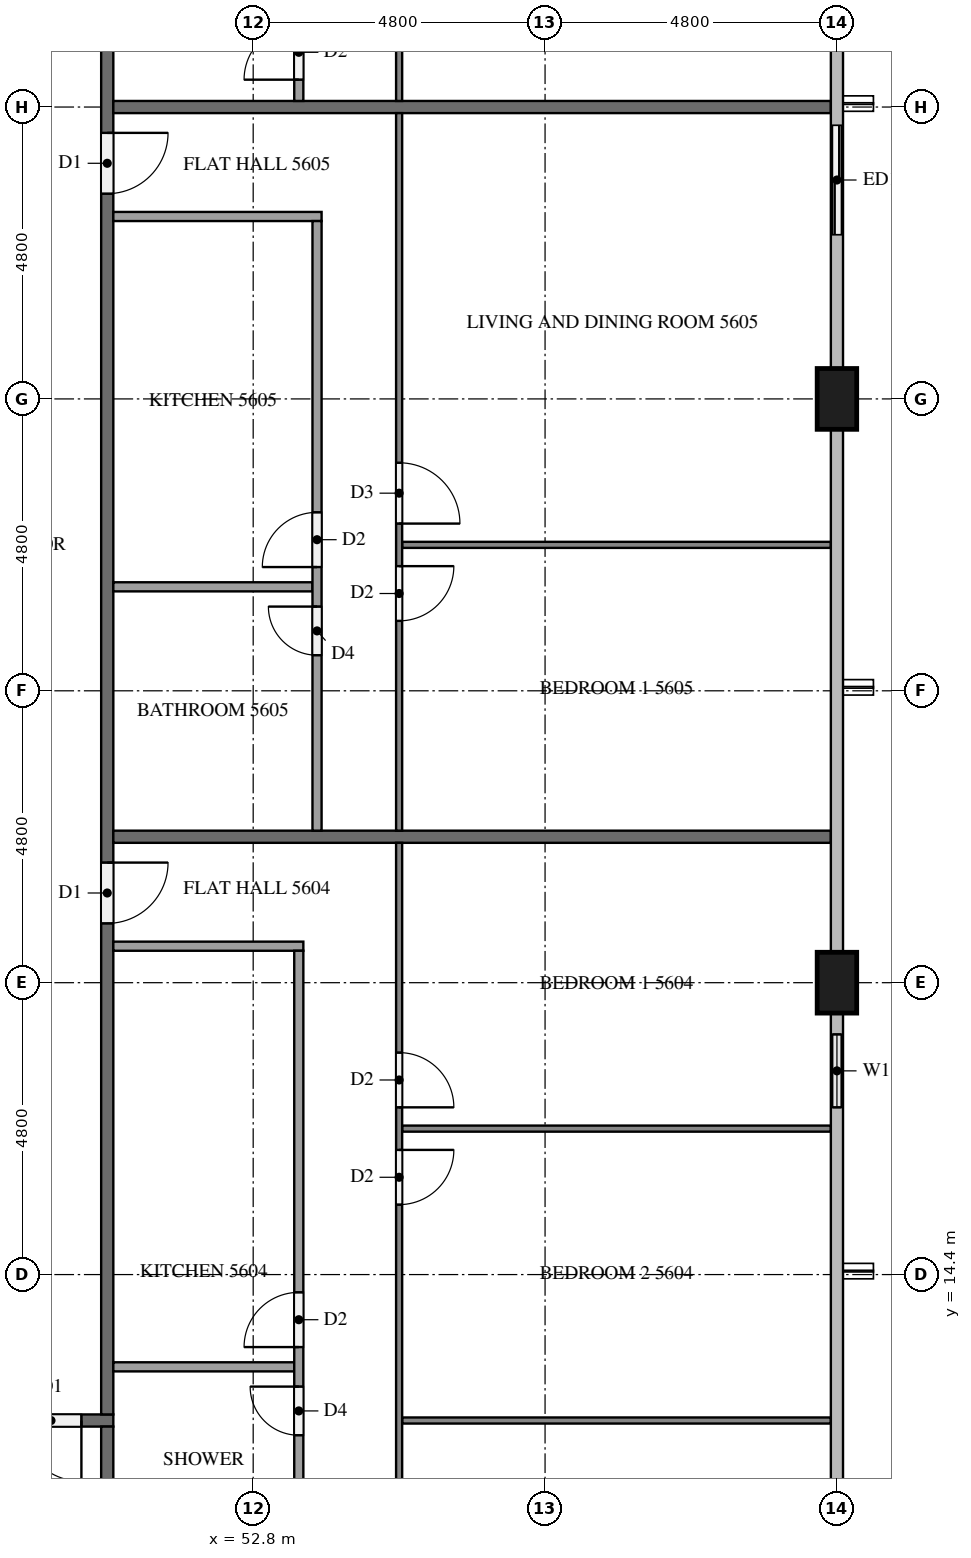
"""IFC4 building model, lengths in metres.
Left out: names, types, materials, properties, quantities, classifications, styles, units other than length and angle.
Written with IfcOpenShell. Run it as: python <this file> out.ifc"""

import sys

from ifc_helpers import new_model, si_unit, direction, frame, frame_2d, origin, origin_2d, place, context, subcontext, project, spatial, rectangle, extrude, element, fill, save


model = new_model("IFC4")
c1 = context("Model", 3, precision=1e-05, world=origin(), true_north=direction((0.0, 1.0)))
c2 = subcontext(c1, "Body", "Model", "MODEL_VIEW")
j1 = project(units=[si_unit("LENGTHUNIT", "METRE"), si_unit("PLANEANGLEUNIT", "RADIAN")], contexts=[c1])
p1 = place(None, origin())
s1 = spatial("IfcSite", under=j1, at=p1, CompositionType="ELEMENT")
p2 = place(p1, origin())
s2 = spatial("IfcBuilding", under=s1, at=p2, CompositionType="ELEMENT")
p3 = place(p2, frame((0.0, 0.0, 215.8)))
s3 = spatial("IfcBuildingStorey", under=s2, at=p3, CompositionType="ELEMENT", Elevation=215.8)
for number, where, z_axis, x_axis in (
    (1, (62.4, 19.2, 0.0), (0.0, 0.0, 1.0), (0.0, 1.0, 0.0)),
    (2, (62.4, 28.8, 0.0), (0.0, 0.0, 1.0), (0.0, 1.0, 0.0)),
):
    element("IfcColumn", number, at=place(p3, frame(where, z_axis=z_axis, x_axis=x_axis)), inside=s3, PredefinedType="COLUMN", context=c2, shape_type="SweptSolid", body=[
        extrude(rectangle(XDim=1.0, YDim=0.65, at=origin_2d()), origin(), (0.0, 0.0, 1.0), 3.2),
    ])
p4 = place(p3, frame((62.4, 16.8, 0.0), z_axis=(0.0, 0.0, 1.0), x_axis=(0.0, 1.0, 0.0)))
e3 = element("IfcWall", 3, at=p4, inside=s3, PredefinedType="SOLIDWALL", context=c2, shape_type="SweptSolid", body=[
    extrude(rectangle(XDim=1.9, YDim=0.15, at=frame_2d((0.95, 0.0))), origin(), (0.0, 0.0, 1.0), 3.2),
])
p5 = place(p4, frame((0.35, 0.0, 0.9)))
e4 = element("IfcOpeningElement", 4, at=p5, cuts=e3, PredefinedType="OPENING", context=c2, shape_type="SweptSolid", body=[
    extrude(rectangle(XDim=1.2, YDim=1.4, at=frame_2d((0.6, 0.7))), frame((0.0, 0.085, 0.0), z_axis=(0.0, -1.0, 0.0), x_axis=(1.0, 0.0, 0.0)), (0.0, 0.0, 1.0), 0.17),
])
p6 = place(p3, frame((62.4, 31.2, 0.0), z_axis=(0.0, 0.0, 1.0), x_axis=(0.0, 1.0, 0.0)))
e5 = element("IfcWall", 5, at=p6, inside=s3, PredefinedType="SOLIDWALL", context=c2, shape_type="SweptSolid", body=[
    extrude(rectangle(XDim=2.4, YDim=0.15, at=frame_2d((1.2, 0.0))), origin(), (0.0, 0.0, 1.0), 3.2),
])
p7 = place(p6, frame((0.3, 0.0, 0.0)))
e6 = element("IfcOpeningElement", 6, at=p7, cuts=e5, PredefinedType="OPENING", context=c2, shape_type="SweptSolid", body=[
    extrude(rectangle(XDim=1.8, YDim=2.4, at=frame_2d((0.9, 1.2))), frame((0.0, 0.085, 0.0), z_axis=(0.0, -1.0, 0.0), x_axis=(1.0, 0.0, 0.0)), (0.0, 0.0, 1.0), 0.17),
])
p8 = place(p3, frame((50.5, 12.0, 0.0), z_axis=(0.0, 0.0, 1.0), x_axis=(-1.0, 0.0, 0.0)))
e7 = element("IfcWall", 7, at=p8, inside=s3, PredefinedType="PARTITIONING", context=c2, shape_type="SweptSolid", body=[
    extrude(rectangle(XDim=38.6, YDim=0.2, at=frame_2d((19.3, 0.0))), origin(), (0.0, 0.0, 1.0), 3.2),
])
p9 = place(p8, frame((37.075, 0.0, 0.0)))
e8 = element("IfcOpeningElement", 8, at=p9, cuts=e7, PredefinedType="OPENING", context=c2, shape_type="SweptSolid", body=[
    extrude(rectangle(XDim=1.0, YDim=2.1, at=frame_2d((0.5, 1.05))), frame((0.0, 0.11, 0.0), z_axis=(0.0, -1.0, 0.0), x_axis=(1.0, 0.0, 0.0)), (0.0, 0.0, 1.0), 0.22),
])
p10 = place(p8, frame((20.275, 0.0, 0.0)))
e9 = element("IfcOpeningElement", 9, at=p10, cuts=e7, PredefinedType="OPENING", context=c2, shape_type="SweptSolid", body=[
    extrude(rectangle(XDim=1.0, YDim=2.1, at=frame_2d((0.5, 1.05))), frame((0.0, 0.11, 0.0), z_axis=(0.0, -1.0, 0.0), x_axis=(1.0, 0.0, 0.0)), (0.0, 0.0, 1.0), 0.22),
])
p11 = place(p8, frame((0.525, 0.0, 0.0)))
e10 = element("IfcOpeningElement", 10, at=p11, cuts=e7, PredefinedType="OPENING", context=c2, shape_type="SweptSolid", body=[
    extrude(rectangle(XDim=1.0, YDim=2.1, at=frame_2d((0.5, 1.05))), frame((0.0, 0.11, 0.0), z_axis=(0.0, -1.0, 0.0), x_axis=(1.0, 0.0, 0.0)), (0.0, 0.0, 1.0), 0.22),
])
p12 = place(p3, frame((50.4, 40.7, 0.0), z_axis=(0.0, 0.0, 1.0), x_axis=(0.0, -1.0, 0.0)))
e11 = element("IfcWall", 11, at=p12, inside=s3, PredefinedType="PARTITIONING", context=c2, shape_type="SweptSolid", body=[
    extrude(rectangle(XDim=28.6, YDim=0.2, at=frame_2d((14.3, 0.0))), origin(), (0.0, 0.0, 1.0), 3.2),
])
p13 = place(p12, frame((19.525, 0.0, 0.0)))
e12 = element("IfcOpeningElement", 12, at=p13, cuts=e11, PredefinedType="OPENING", context=c2, shape_type="SweptSolid", body=[
    extrude(rectangle(XDim=1.0, YDim=2.1, at=frame_2d((0.5, 1.05))), frame((0.0, 0.11, 0.0), z_axis=(0.0, -1.0, 0.0), x_axis=(1.0, 0.0, 0.0)), (0.0, 0.0, 1.0), 0.22),
])
p14 = place(p12, frame((7.525, 0.0, 0.0)))
e13 = element("IfcOpeningElement", 13, at=p14, cuts=e11, PredefinedType="OPENING", context=c2, shape_type="SweptSolid", body=[
    extrude(rectangle(XDim=1.0, YDim=2.1, at=frame_2d((0.5, 1.05))), frame((0.0, 0.11, 0.0), z_axis=(0.0, -1.0, 0.0), x_axis=(1.0, 0.0, 0.0)), (0.0, 0.0, 1.0), 0.22),
])
p15 = place(p12, frame((0.325, 0.0, 0.0)))
e14 = element("IfcOpeningElement", 14, at=p15, cuts=e11, PredefinedType="OPENING", context=c2, shape_type="SweptSolid", body=[
    extrude(rectangle(XDim=1.0, YDim=2.1, at=frame_2d((0.5, 1.05))), frame((0.0, 0.11, 0.0), z_axis=(0.0, -1.0, 0.0), x_axis=(1.0, 0.0, 0.0)), (0.0, 0.0, 1.0), 0.22),
])
p16 = place(p3, frame((50.4, 11.9, 0.0), z_axis=(0.0, 0.0, 1.0), x_axis=(0.0, -1.0, 0.0)))
e15 = element("IfcWall", 15, at=p16, inside=s3, PredefinedType="PARTITIONING", context=c2, shape_type="SweptSolid", body=[
    extrude(rectangle(XDim=7.0, YDim=0.2, at=frame_2d((3.5, 0.0))), origin(), (0.0, 0.0, 1.0), 3.2),
])
for number, where, z_axis, x_axis in (
    (16, (50.5, 21.6, 0.0), (0.0, 0.0, 1.0), (1.0, 0.0, 0.0)),
    (17, (50.5, 33.6, 0.0), (0.0, 0.0, 1.0), (1.0, 0.0, 0.0)),
):
    element("IfcWall", number, at=place(p3, frame(where, z_axis=z_axis, x_axis=x_axis)), inside=s3, PredefinedType="PARTITIONING", context=c2, shape_type="SweptSolid", body=[
        extrude(rectangle(XDim=11.8, YDim=0.2, at=frame_2d((5.9, 0.0))), origin(), (0.0, 0.0, 1.0), 3.2),
    ])
for number, where, z_axis, x_axis in (
    (18, (55.25, 16.8, 0.0), (0.0, 0.0, 1.0), (1.0, 0.0, 0.0)),
    (19, (55.25, 12.0, 0.0), (0.0, 0.0, 1.0), (1.0, 0.0, 0.0)),
):
    element("IfcWall", number, at=place(p3, frame(where, z_axis=z_axis, x_axis=x_axis)), inside=s3, PredefinedType="PARTITIONING", context=c2, shape_type="SweptSolid", body=[
        extrude(rectangle(XDim=7.05, YDim=0.1, at=frame_2d((3.525, 0.0))), origin(), (0.0, 0.0, 1.0), 3.2),
    ])
p17 = place(p3, frame((55.2, 21.5, 0.0), z_axis=(0.0, 0.0, 1.0), x_axis=(0.0, -1.0, 0.0)))
e20 = element("IfcWall", 20, at=p17, inside=s3, PredefinedType="PARTITIONING", context=c2, shape_type="SweptSolid", body=[
    extrude(rectangle(XDim=16.6, YDim=0.1, at=frame_2d((8.3, 0.0))), origin(), (0.0, 0.0, 1.0), 3.2),
])
p18 = place(p17, frame((3.45, 0.0, 0.0)))
e21 = element("IfcOpeningElement", 21, at=p18, cuts=e20, PredefinedType="OPENING", context=c2, shape_type="SweptSolid", body=[
    extrude(rectangle(XDim=0.9, YDim=2.1, at=frame_2d((0.45, 1.05))), frame((0.0, 0.06, 0.0), z_axis=(0.0, -1.0, 0.0), x_axis=(1.0, 0.0, 0.0)), (0.0, 0.0, 1.0), 0.12),
])
p19 = place(p17, frame((5.05, 0.0, 0.0)))
e22 = element("IfcOpeningElement", 22, at=p19, cuts=e20, PredefinedType="OPENING", context=c2, shape_type="SweptSolid", body=[
    extrude(rectangle(XDim=0.9, YDim=2.1, at=frame_2d((0.45, 1.05))), frame((0.0, 0.06, 0.0), z_axis=(0.0, -1.0, 0.0), x_axis=(1.0, 0.0, 0.0)), (0.0, 0.0, 1.0), 0.12),
])
p20 = place(p17, frame((15.3, 0.0, 0.0)))
e23 = element("IfcOpeningElement", 23, at=p20, cuts=e20, PredefinedType="OPENING", context=c2, shape_type="SweptSolid", body=[
    extrude(rectangle(XDim=1.0, YDim=2.1, at=frame_2d((0.5, 1.05))), frame((0.0, 0.06, 0.0), z_axis=(0.0, -1.0, 0.0), x_axis=(1.0, 0.0, 0.0)), (0.0, 0.0, 1.0), 0.12),
])
p21 = place(p3, frame((50.5, 12.883, 0.0), z_axis=(0.0, 0.0, 1.0), x_axis=(1.0, 0.0, 0.0)))
e24 = element("IfcWall", 24, at=p21, inside=s3, PredefinedType="PARTITIONING", context=c2, shape_type="SweptSolid", body=[
    extrude(rectangle(XDim=2.975, YDim=0.15, at=frame_2d((1.488, 0.0))), origin(), (0.0, 0.0, 1.0), 3.2),
])
p22 = place(p3, frame((50.5, 19.8, 0.0), z_axis=(0.0, 0.0, 1.0), x_axis=(1.0, 0.0, 0.0)))
e25 = element("IfcWall", 25, at=p22, inside=s3, PredefinedType="PARTITIONING", context=c2, shape_type="SweptSolid", body=[
    extrude(rectangle(XDim=3.125, YDim=0.15, at=frame_2d((1.562, 0.0))), origin(), (0.0, 0.0, 1.0), 3.2),
])
p23 = place(p3, frame((53.55, 4.9, 0.0), z_axis=(0.0, 0.0, 1.0), x_axis=(0.0, 1.0, 0.0)))
e26 = element("IfcWall", 26, at=p23, inside=s3, PredefinedType="PARTITIONING", context=c2, shape_type="SweptSolid", body=[
    extrude(rectangle(XDim=14.825, YDim=0.15, at=frame_2d((7.413, 0.0))), origin(), (0.0, 0.0, 1.0), 3.2),
])
p24 = place(p23, frame((8.308, 0.0, 0.0)))
e27 = element("IfcOpeningElement", 27, at=p24, cuts=e26, PredefinedType="OPENING", context=c2, shape_type="SweptSolid", body=[
    extrude(rectangle(XDim=0.9, YDim=2.1, at=frame_2d((0.45, 1.05))), frame((0.0, 0.085, 0.0), z_axis=(0.0, -1.0, 0.0), x_axis=(1.0, 0.0, 0.0)), (0.0, 0.0, 1.0), 0.17),
])
p25 = place(p23, frame((6.858, 0.0, 0.0)))
e28 = element("IfcOpeningElement", 28, at=p25, cuts=e26, PredefinedType="OPENING", context=c2, shape_type="SweptSolid", body=[
    extrude(rectangle(XDim=0.8, YDim=2.1, at=frame_2d((0.4, 1.05))), frame((0.0, 0.085, 0.0), z_axis=(0.0, -1.0, 0.0), x_axis=(1.0, 0.0, 0.0)), (0.0, 0.0, 1.0), 0.17),
])
p26 = place(p23, frame((0.35, 0.0, 0.0)))
e29 = element("IfcOpeningElement", 29, at=p26, cuts=e26, PredefinedType="OPENING", context=c2, shape_type="SweptSolid", body=[
    extrude(rectangle(XDim=0.9, YDim=2.1, at=frame_2d((0.45, 1.05))), frame((0.0, 0.085, 0.0), z_axis=(0.0, -1.0, 0.0), x_axis=(1.0, 0.0, 0.0)), (0.0, 0.0, 1.0), 0.17),
])
p27 = place(p3, frame((55.25, 26.4, 0.0), z_axis=(0.0, 0.0, 1.0), x_axis=(1.0, 0.0, 0.0)))
e30 = element("IfcWall", 30, at=p27, inside=s3, PredefinedType="PARTITIONING", context=c2, shape_type="SweptSolid", body=[
    extrude(rectangle(XDim=7.05, YDim=0.1, at=frame_2d((3.525, 0.0))), origin(), (0.0, 0.0, 1.0), 3.2),
])
p28 = place(p3, frame((55.2, 33.5, 0.0), z_axis=(0.0, 0.0, 1.0), x_axis=(0.0, -1.0, 0.0)))
e31 = element("IfcWall", 31, at=p28, inside=s3, PredefinedType="PARTITIONING", context=c2, shape_type="SweptSolid", body=[
    extrude(rectangle(XDim=11.8, YDim=0.1, at=frame_2d((5.9, 0.0))), origin(), (0.0, 0.0, 1.0), 3.2),
])
p29 = place(p28, frame((5.75, 0.0, 0.0)))
e32 = element("IfcOpeningElement", 32, at=p29, cuts=e31, PredefinedType="OPENING", context=c2, shape_type="SweptSolid", body=[
    extrude(rectangle(XDim=1.0, YDim=2.1, at=frame_2d((0.5, 1.05))), frame((0.0, 0.06, 0.0), z_axis=(0.0, -1.0, 0.0), x_axis=(1.0, 0.0, 0.0)), (0.0, 0.0, 1.0), 0.12),
])
p30 = place(p28, frame((7.45, 0.0, 0.0)))
e33 = element("IfcOpeningElement", 33, at=p30, cuts=e31, PredefinedType="OPENING", context=c2, shape_type="SweptSolid", body=[
    extrude(rectangle(XDim=0.9, YDim=2.1, at=frame_2d((0.45, 1.05))), frame((0.0, 0.06, 0.0), z_axis=(0.0, -1.0, 0.0), x_axis=(1.0, 0.0, 0.0)), (0.0, 0.0, 1.0), 0.12),
])
p31 = place(p3, frame((50.5, 25.71, 0.0), z_axis=(0.0, 0.0, 1.0), x_axis=(1.0, 0.0, 0.0)))
e34 = element("IfcWall", 34, at=p31, inside=s3, PredefinedType="PARTITIONING", context=c2, shape_type="SweptSolid", body=[
    extrude(rectangle(XDim=3.275, YDim=0.15, at=frame_2d((1.637, 0.0))), origin(), (0.0, 0.0, 1.0), 3.2),
])
p32 = place(p3, frame((50.5, 31.8, 0.0), z_axis=(0.0, 0.0, 1.0), x_axis=(1.0, 0.0, 0.0)))
e35 = element("IfcWall", 35, at=p32, inside=s3, PredefinedType="PARTITIONING", context=c2, shape_type="SweptSolid", body=[
    extrude(rectangle(XDim=3.425, YDim=0.15, at=frame_2d((1.712, 0.0))), origin(), (0.0, 0.0, 1.0), 3.2),
])
p33 = place(p3, frame((53.85, 21.7, 0.0), z_axis=(0.0, 0.0, 1.0), x_axis=(0.0, 1.0, 0.0)))
e36 = element("IfcWall", 36, at=p33, inside=s3, PredefinedType="PARTITIONING", context=c2, shape_type="SweptSolid", body=[
    extrude(rectangle(XDim=10.025, YDim=0.15, at=frame_2d((5.013, 0.0))), origin(), (0.0, 0.0, 1.0), 3.2),
])
p34 = place(p33, frame((4.335, 0.0, 0.0)))
e37 = element("IfcOpeningElement", 37, at=p34, cuts=e36, PredefinedType="OPENING", context=c2, shape_type="SweptSolid", body=[
    extrude(rectangle(XDim=0.9, YDim=2.1, at=frame_2d((0.45, 1.05))), frame((0.0, 0.085, 0.0), z_axis=(0.0, -1.0, 0.0), x_axis=(1.0, 0.0, 0.0)), (0.0, 0.0, 1.0), 0.17),
])
p35 = place(p33, frame((2.885, 0.0, 0.0)))
e38 = element("IfcOpeningElement", 38, at=p35, cuts=e36, PredefinedType="OPENING", context=c2, shape_type="SweptSolid", body=[
    extrude(rectangle(XDim=0.8, YDim=2.1, at=frame_2d((0.4, 1.05))), frame((0.0, 0.085, 0.0), z_axis=(0.0, -1.0, 0.0), x_axis=(1.0, 0.0, 0.0)), (0.0, 0.0, 1.0), 0.17),
])
p36 = place(p3, frame((55.2, 40.7, 0.0), z_axis=(0.0, 0.0, 1.0), x_axis=(0.0, -1.0, 0.0)))
e39 = element("IfcWall", 39, at=p36, inside=s3, PredefinedType="PARTITIONING", context=c2, shape_type="SweptSolid", body=[
    extrude(rectangle(XDim=7.0, YDim=0.1, at=frame_2d((3.5, 0.0))), origin(), (0.0, 0.0, 1.0), 3.2),
])
p37 = place(p36, frame((0.3, 0.0, 0.0)))
e40 = element("IfcOpeningElement", 40, at=p37, cuts=e39, PredefinedType="OPENING", context=c2, shape_type="SweptSolid", body=[
    extrude(rectangle(XDim=1.0, YDim=2.1, at=frame_2d((0.5, 1.05))), frame((0.0, 0.06, 0.0), z_axis=(0.0, -1.0, 0.0), x_axis=(1.0, 0.0, 0.0)), (0.0, 0.0, 1.0), 0.12),
])
p38 = place(p3, frame((53.55, 33.7, 0.0), z_axis=(0.0, 0.0, 1.0), x_axis=(0.0, 1.0, 0.0)))
e41 = element("IfcWall", 41, at=p38, inside=s3, PredefinedType="PARTITIONING", context=c2, shape_type="SweptSolid", body=[
    extrude(rectangle(XDim=5.225, YDim=0.15, at=frame_2d((2.613, 0.0))), origin(), (0.0, 0.0, 1.0), 3.2),
])
p39 = place(p38, frame((4.125, 0.0, 0.0)))
e42 = element("IfcOpeningElement", 42, at=p39, cuts=e41, PredefinedType="OPENING", context=c2, shape_type="SweptSolid", body=[
    extrude(rectangle(XDim=0.8, YDim=2.1, at=frame_2d((0.4, 1.05))), frame((0.0, 0.085, 0.0), z_axis=(0.0, -1.0, 0.0), x_axis=(1.0, 0.0, 0.0)), (0.0, 0.0, 1.0), 0.17),
])
p40 = place(p38, frame((0.35, 0.0, 0.0)))
e43 = element("IfcOpeningElement", 43, at=p40, cuts=e41, PredefinedType="OPENING", context=c2, shape_type="SweptSolid", body=[
    extrude(rectangle(XDim=0.9, YDim=2.1, at=frame_2d((0.45, 1.05))), frame((0.0, 0.085, 0.0), z_axis=(0.0, -1.0, 0.0), x_axis=(1.0, 0.0, 0.0)), (0.0, 0.0, 1.0), 0.17),
])
p41 = place(p5, origin())
e44 = element("IfcWindow", 44, at=p41, inside=s3, PartitioningType="SINGLE_PANEL", PredefinedType="WINDOW", context=c2, shape_type="SweptSolid", body=[
    extrude(rectangle(XDim=1.2, YDim=1.4, at=frame_2d((0.6, 0.7))), frame((0.0, 0.03, 0.0), z_axis=(0.0, -1.0, 0.0), x_axis=(1.0, 0.0, 0.0)), (0.0, 0.0, 1.0), 0.06),
])
fill(e4, e44)
p42 = place(p7, origin())
e45 = element("IfcDoor", 45, at=p42, inside=s3, OperationType="SLIDING_TO_RIGHT", PredefinedType="DOOR", context=c2, shape_type="SweptSolid", body=[
    extrude(rectangle(XDim=1.8, YDim=2.4, at=frame_2d((0.9, 1.2))), frame((0.0, 0.025, 0.0), z_axis=(0.0, -1.0, 0.0), x_axis=(1.0, 0.0, 0.0)), (0.0, 0.0, 1.0), 0.05),
])
fill(e6, e45)
p43 = place(p11, origin())
e46 = element("IfcDoor", 46, at=p43, inside=s3, OperationType="SINGLE_SWING_LEFT", PredefinedType="DOOR", context=c2, shape_type="SweptSolid", body=[
    extrude(rectangle(XDim=1.0, YDim=2.1, at=frame_2d((0.5, 1.05))), frame((0.0, 0.025, 0.0), z_axis=(0.0, -1.0, 0.0), x_axis=(1.0, 0.0, 0.0)), (0.0, 0.0, 1.0), 0.05),
])
fill(e10, e46)
p44 = place(p13, origin())
e47 = element("IfcDoor", 47, at=p44, inside=s3, OperationType="SINGLE_SWING_LEFT", PredefinedType="DOOR", context=c2, shape_type="SweptSolid", body=[
    extrude(rectangle(XDim=1.0, YDim=2.1, at=frame_2d((0.5, 1.05))), frame((0.0, 0.025, 0.0), z_axis=(0.0, -1.0, 0.0), x_axis=(1.0, 0.0, 0.0)), (0.0, 0.0, 1.0), 0.05),
])
fill(e12, e47)
p45 = place(p14, origin())
e48 = element("IfcDoor", 48, at=p45, inside=s3, OperationType="SINGLE_SWING_LEFT", PredefinedType="DOOR", context=c2, shape_type="SweptSolid", body=[
    extrude(rectangle(XDim=1.0, YDim=2.1, at=frame_2d((0.5, 1.05))), frame((0.0, 0.025, 0.0), z_axis=(0.0, -1.0, 0.0), x_axis=(1.0, 0.0, 0.0)), (0.0, 0.0, 1.0), 0.05),
])
fill(e13, e48)
p46 = place(p18, origin())
e49 = element("IfcDoor", 49, at=p46, inside=s3, OperationType="SINGLE_SWING_RIGHT", PredefinedType="DOOR", context=c2, shape_type="SweptSolid", body=[
    extrude(rectangle(XDim=0.9, YDim=2.1, at=frame_2d((0.45, 1.05))), frame((0.0, 0.025, 0.0), z_axis=(0.0, -1.0, 0.0), x_axis=(1.0, 0.0, 0.0)), (0.0, 0.0, 1.0), 0.05),
])
fill(e21, e49)
p47 = place(p19, origin())
e50 = element("IfcDoor", 50, at=p47, inside=s3, OperationType="SINGLE_SWING_LEFT", PredefinedType="DOOR", context=c2, shape_type="SweptSolid", body=[
    extrude(rectangle(XDim=0.9, YDim=2.1, at=frame_2d((0.45, 1.05))), frame((0.0, 0.025, 0.0), z_axis=(0.0, -1.0, 0.0), x_axis=(1.0, 0.0, 0.0)), (0.0, 0.0, 1.0), 0.05),
])
fill(e22, e50)
p48 = place(p24, origin())
e51 = element("IfcDoor", 51, at=p48, inside=s3, OperationType="SINGLE_SWING_LEFT", PredefinedType="DOOR", context=c2, shape_type="SweptSolid", body=[
    extrude(rectangle(XDim=0.9, YDim=2.1, at=frame_2d((0.45, 1.05))), frame((0.0, 0.025, 0.0), z_axis=(0.0, -1.0, 0.0), x_axis=(1.0, 0.0, 0.0)), (0.0, 0.0, 1.0), 0.05),
])
fill(e27, e51)
p49 = place(p25, origin())
e52 = element("IfcDoor", 52, at=p49, inside=s3, OperationType="SINGLE_SWING_RIGHT", PredefinedType="DOOR", context=c2, shape_type="SweptSolid", body=[
    extrude(rectangle(XDim=0.8, YDim=2.1, at=frame_2d((0.4, 1.05))), frame((0.0, 0.025, 0.0), z_axis=(0.0, -1.0, 0.0), x_axis=(1.0, 0.0, 0.0)), (0.0, 0.0, 1.0), 0.05),
])
fill(e28, e52)
p50 = place(p29, origin())
e53 = element("IfcDoor", 53, at=p50, inside=s3, OperationType="SINGLE_SWING_RIGHT", PredefinedType="DOOR", context=c2, shape_type="SweptSolid", body=[
    extrude(rectangle(XDim=1.0, YDim=2.1, at=frame_2d((0.5, 1.05))), frame((0.0, 0.025, 0.0), z_axis=(0.0, -1.0, 0.0), x_axis=(1.0, 0.0, 0.0)), (0.0, 0.0, 1.0), 0.05),
])
fill(e32, e53)
p51 = place(p30, origin())
e54 = element("IfcDoor", 54, at=p51, inside=s3, OperationType="SINGLE_SWING_LEFT", PredefinedType="DOOR", context=c2, shape_type="SweptSolid", body=[
    extrude(rectangle(XDim=0.9, YDim=2.1, at=frame_2d((0.45, 1.05))), frame((0.0, 0.025, 0.0), z_axis=(0.0, -1.0, 0.0), x_axis=(1.0, 0.0, 0.0)), (0.0, 0.0, 1.0), 0.05),
])
fill(e33, e54)
p52 = place(p34, origin())
e55 = element("IfcDoor", 55, at=p52, inside=s3, OperationType="SINGLE_SWING_LEFT", PredefinedType="DOOR", context=c2, shape_type="SweptSolid", body=[
    extrude(rectangle(XDim=0.9, YDim=2.1, at=frame_2d((0.45, 1.05))), frame((0.0, 0.025, 0.0), z_axis=(0.0, -1.0, 0.0), x_axis=(1.0, 0.0, 0.0)), (0.0, 0.0, 1.0), 0.05),
])
fill(e37, e55)
p53 = place(p35, origin())
e56 = element("IfcDoor", 56, at=p53, inside=s3, OperationType="SINGLE_SWING_RIGHT", PredefinedType="DOOR", context=c2, shape_type="SweptSolid", body=[
    extrude(rectangle(XDim=0.8, YDim=2.1, at=frame_2d((0.4, 1.05))), frame((0.0, 0.025, 0.0), z_axis=(0.0, -1.0, 0.0), x_axis=(1.0, 0.0, 0.0)), (0.0, 0.0, 1.0), 0.05),
])
fill(e38, e56)
p54 = place(p40, origin())
e57 = element("IfcDoor", 57, at=p54, inside=s3, OperationType="SINGLE_SWING_LEFT", PredefinedType="DOOR", context=c2, shape_type="SweptSolid", body=[
    extrude(rectangle(XDim=0.9, YDim=2.1, at=frame_2d((0.45, 1.05))), frame((0.0, 0.025, 0.0), z_axis=(0.0, -1.0, 0.0), x_axis=(1.0, 0.0, 0.0)), (0.0, 0.0, 1.0), 0.05),
])
fill(e43, e57)
save(model, sys.argv[1])
